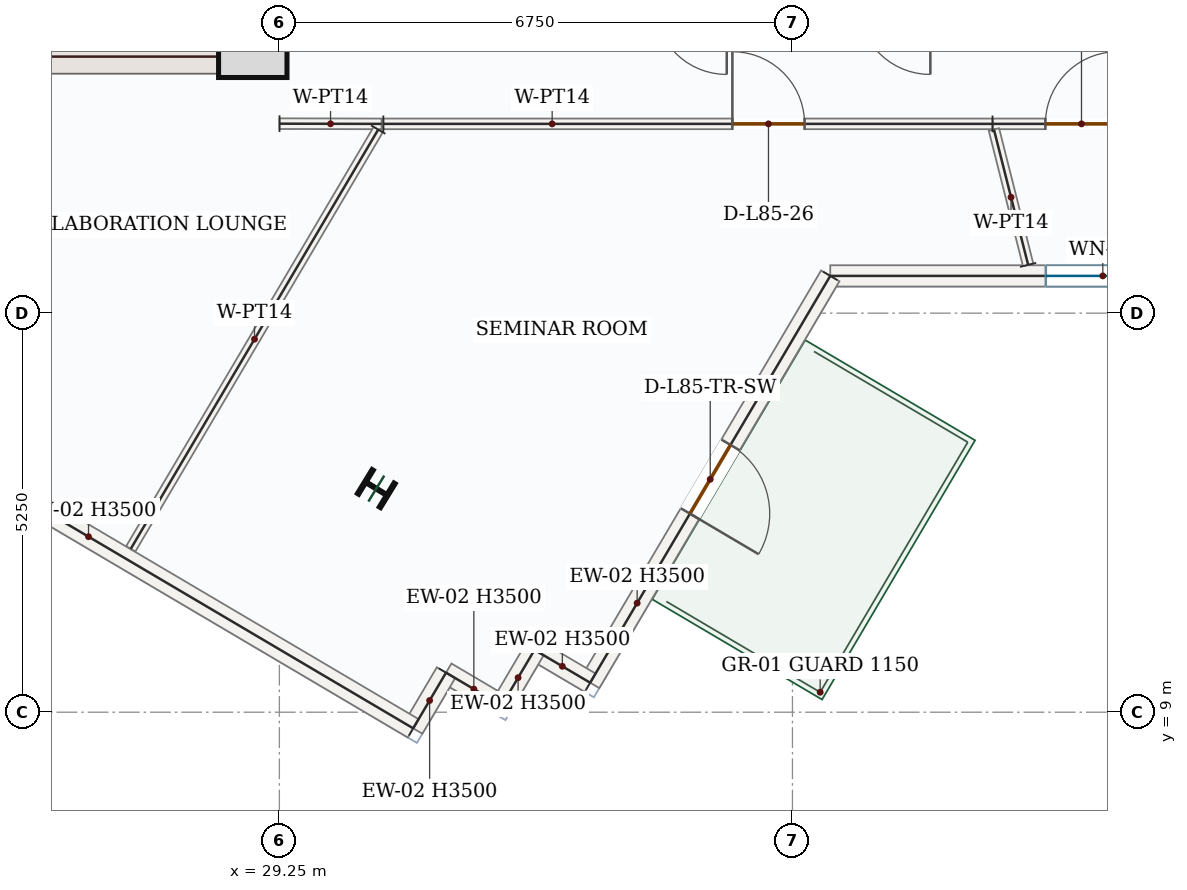
"""IFC4 building model, lengths in metres.
Left out: names, types, materials, properties, quantities, classifications, styles, units other than length and angle.
Written with IfcOpenShell. Run it as: python <this file> out.ifc"""

import sys

from ifc_helpers import new_model, si_unit, direction, frame, frame_2d, origin, origin_2d, place, context, subcontext, project, spatial, rectangle, i_section, extrude, source, transform, mapped, element, fill, save


model = new_model("IFC4")
c1 = context("Model", 3, precision=1e-05, world=origin(), true_north=direction((0.0, 1.0)))
c2 = subcontext(c1, "Body", "Model", "MODEL_VIEW")
j1 = project(units=[si_unit("LENGTHUNIT", "METRE"), si_unit("PLANEANGLEUNIT", "RADIAN")], contexts=[c1])
p1 = place(None, origin())
s1 = spatial("IfcSite", under=j1, at=p1, CompositionType="ELEMENT")
p2 = place(p1, origin())
s2 = spatial("IfcBuilding", under=s1, at=p2, CompositionType="ELEMENT")
p3 = place(p2, frame((0.0, 0.0, 349.8)))
s3 = spatial("IfcBuildingStorey", under=s2, at=p3, CompositionType="ELEMENT", Elevation=349.8)
p4 = place(p3, frame((29.025, 17.4, 0.0), z_axis=(0.0, 0.0, 1.0), x_axis=(0.0, 1.0, 0.0)))
e1 = element("IfcWall", 1, at=p4, inside=s3, PredefinedType="SHEAR", context=c2, shape_type="SweptSolid", body=[
    extrude(rectangle(XDim=8.55, YDim=0.45, at=frame_2d((4.275, 0.0))), origin(), (0.0, 0.0, 1.0), 3.5),
])
p5 = place(p4, frame((6.65, 0.0, 0.0)))
e2 = element("IfcOpeningElement", 2, at=p5, cuts=e1, PredefinedType="OPENING", context=c2, shape_type="SweptSolid", body=[
    extrude(rectangle(XDim=1.1, YDim=2.2, at=frame_2d((0.55, 1.1))), frame((0.0, 0.235, 0.0), z_axis=(0.0, -1.0, 0.0), x_axis=(1.0, 0.0, 0.0)), (0.0, 0.0, 1.0), 0.47),
])
p6 = place(p4, frame((2.7, 0.0, 0.0)))
e3 = element("IfcOpeningElement", 3, at=p6, cuts=e1, PredefinedType="OPENING", context=c2, shape_type="SweptSolid", body=[
    extrude(rectangle(XDim=0.88, YDim=2.1, at=frame_2d((0.44, 1.05))), frame((0.0, 0.235, 0.0), z_axis=(0.0, -1.0, 0.0), x_axis=(1.0, 0.0, 0.0)), (0.0, 0.0, 1.0), 0.47),
])
p7 = place(p4, frame((4.6, 0.0, 0.0)))
e4 = element("IfcOpeningElement", 4, at=p7, cuts=e1, PredefinedType="OPENING", context=c2, shape_type="SweptSolid", body=[
    extrude(rectangle(XDim=0.88, YDim=2.1, at=frame_2d((0.44, 1.05))), frame((0.0, 0.235, 0.0), z_axis=(0.0, -1.0, 0.0), x_axis=(1.0, 0.0, 0.0)), (0.0, 0.0, 1.0), 0.47),
])
m1 = source(origin(), c2, "Body", "SweptSolid", [
    extrude(rectangle(XDim=7.1, YDim=0.45, at=frame_2d((3.55, 0.0))), origin(), (0.0, 0.0, 1.0), 3.5),
])
p8 = place(p3, frame((21.7, 17.625, 0.0), z_axis=(0.0, 0.0, 1.0), x_axis=(1.0, 0.0, 0.0)))
e5 = element("IfcWall", 5, at=p8, inside=s3, PredefinedType="SHEAR", context=c2, shape_type="MappedRepresentation", body=[
    mapped(m1, transform((0.0, 0.0, 0.0), x_axis=(1.0, 0.0, 0.0), y_axis=(0.0, 1.0, 0.0), z_axis=(0.0, 0.0, 1.0), scale=1.0)),
])
m2 = source(origin(), c2, "Body", "SweptSolid", [
    extrude(rectangle(XDim=0.9, YDim=0.9, at=origin_2d()), origin(), (0.0, 0.0, 1.0), 3.75),
])
p9 = place(p3, frame((28.9, 17.8, 0.0), z_axis=(0.0, 0.0, 1.0), x_axis=(1.0, 0.0, 0.0)))
e6 = element("IfcColumn", 6, at=p9, inside=s3, PredefinedType="COLUMN", context=c2, shape_type="MappedRepresentation", body=[
    mapped(m2, transform((0.0, 0.0, 0.0), x_axis=(1.0, 0.0, 0.0), y_axis=(0.0, 1.0, 0.0), z_axis=(0.0, 0.0, 1.0), scale=1.0)),
])
m3 = source(origin(), c2, "Body", "SweptSolid", [
    extrude(i_section(OverallWidth=0.369, OverallDepth=0.356, WebThickness=0.011, FlangeThickness=0.018, FilletRadius=0.018, at=origin_2d()), origin(), (0.0, 0.0, 1.0), 3.75),
])
p10 = place(p3, frame((30.525, 11.942, 0.0), z_axis=(0.0, 0.0, 1.0), x_axis=(0.522498564716, 0.852640164354, 0.0)))
e7 = element("IfcColumn", 7, at=p10, inside=s3, PredefinedType="COLUMN", context=c2, shape_type="MappedRepresentation", body=[
    mapped(m3, transform((0.0, 0.0, 0.0), x_axis=(1.0, 0.0, 0.0), y_axis=(0.0, 1.0, 0.0), z_axis=(0.0, 0.0, 1.0), scale=1.0)),
])
p11 = place(p3, frame((43.669, 14.74, 0.0), z_axis=(0.0, 0.0, 1.0), x_axis=(-1.0, 0.0, 0.0)))
e8 = element("IfcWall", 8, at=p11, inside=s3, PredefinedType="SOLIDWALL", context=c2, shape_type="SweptSolid", body=[
    extrude(rectangle(XDim=7.172, YDim=0.28, at=frame_2d((3.586, 0.0))), origin(), (0.0, 0.0, 1.0), 3.5),
])
p12 = place(p11, frame((2.836, 0.0, 0.85)))
e9 = element("IfcOpeningElement", 9, at=p12, cuts=e8, PredefinedType="OPENING", context=c2, shape_type="SweptSolid", body=[
    extrude(rectangle(XDim=1.5, YDim=1.5, at=frame_2d((0.75, 0.75))), frame((0.0, 0.15, 0.0), z_axis=(0.0, -1.0, 0.0), x_axis=(1.0, 0.0, 0.0)), (0.0, 0.0, 1.0), 0.3),
])
p13 = place(p3, frame((36.497, 14.74, 0.0), z_axis=(0.0, 0.0, 1.0), x_axis=(-0.508266003384, -0.861200133421, 0.0)))
e10 = element("IfcWall", 10, at=p13, inside=s3, PredefinedType="SOLIDWALL", context=c2, shape_type="SweptSolid", body=[
    extrude(rectangle(XDim=6.215, YDim=0.28, at=frame_2d((3.107, 0.0))), origin(), (0.0, 0.0, 1.0), 3.5),
])
p14 = place(p13, frame((2.582, 0.0, 0.0)))
e11 = element("IfcOpeningElement", 11, at=p14, cuts=e10, PredefinedType="OPENING", context=c2, shape_type="SweptSolid", body=[
    extrude(rectangle(XDim=1.05, YDim=2.15, at=frame_2d((0.525, 1.075))), frame((0.0, 0.15, 0.0), z_axis=(0.0, -1.0, 0.0), x_axis=(1.0, 0.0, 0.0)), (0.0, 0.0, 1.0), 0.3),
])
m4 = source(origin(), c2, "Body", "SweptSolid", [
    extrude(rectangle(XDim=0.85, YDim=0.28, at=frame_2d((0.425, 0.0))), origin(), (0.0, 0.0, 1.0), 3.5),
])
for number, where, z_axis, x_axis in (
    (12, (33.339, 9.388, 0.0), (0.0, 0.0, 1.0), (-0.861, 0.508, 0.0)),
    (13, (32.606, 9.82, 0.0), (0.0, 0.0, 1.0), (-0.508, -0.861, 0.0)),
    (14, (32.175, 9.088, 0.0), (0.0, 0.0, 1.0), (-0.861, 0.508, 0.0)),
):
    element("IfcWall", number, at=place(p3, frame(where, z_axis=z_axis, x_axis=x_axis)), inside=s3, PredefinedType="SOLIDWALL", context=c2, shape_type="MappedRepresentation", body=[
        mapped(m4, transform((0.0, 0.0, 0.0), x_axis=(1.0, 0.0, 0.0), y_axis=(0.0, 1.0, 0.0), z_axis=(0.0, 0.0, 1.0), scale=1.0)),
    ])
m5 = source(origin(), c2, "Body", "SweptSolid", [
    extrude(rectangle(XDim=0.85, YDim=0.28, at=frame_2d((0.425, 0.0))), origin(), (0.0, 0.0, 1.0), 3.5),
])
p15 = place(p3, frame((31.442, 9.52, 0.0), z_axis=(0.0, 0.0, 1.0), x_axis=(-0.508187218622, -0.861246626019, 0.0)))
e15 = element("IfcWall", 15, at=p15, inside=s3, PredefinedType="SOLIDWALL", context=c2, shape_type="MappedRepresentation", body=[
    mapped(m5, transform((0.0, 0.0, 0.0), x_axis=(1.0, 0.0, 0.0), y_axis=(0.0, 1.0, 0.0), z_axis=(0.0, 0.0, 1.0), scale=1.0)),
])
m6 = source(origin(), c2, "Body", "SweptSolid", [
    extrude(rectangle(XDim=9.92, YDim=0.28, at=frame_2d((4.96, 0.0))), origin(), (0.0, 0.0, 1.0), 3.5),
])
p16 = place(p3, frame((31.01, 8.788, 0.0), z_axis=(0.0, 0.0, 1.0), x_axis=(-0.861192451778, 0.508279018848, 0.0)))
e16 = element("IfcWall", 16, at=p16, inside=s3, PredefinedType="SOLIDWALL", context=c2, shape_type="MappedRepresentation", body=[
    mapped(m6, transform((0.0, 0.0, 0.0), x_axis=(1.0, 0.0, 0.0), y_axis=(0.0, 1.0, 0.0), z_axis=(0.0, 0.0, 1.0), scale=1.0)),
])
p17 = place(p3, frame((38.632, 16.74, 0.0), z_axis=(0.0, 0.0, 1.0), x_axis=(1.0, 0.0, 0.0)))
e17 = element("IfcWall", 17, at=p17, inside=s3, PredefinedType="PARTITIONING", context=c2, shape_type="SweptSolid", body=[
    extrude(rectangle(XDim=4.112, YDim=0.14, at=frame_2d((2.056, 0.0))), origin(), (0.0, 0.0, 1.0), 3.5),
])
p18 = place(p17, frame((0.696, 0.0, 0.0)))
e18 = element("IfcOpeningElement", 18, at=p18, cuts=e17, PredefinedType="OPENING", context=c2, shape_type="SweptSolid", body=[
    extrude(rectangle(XDim=0.95, YDim=2.15, at=frame_2d((0.475, 1.075))), frame((0.0, 0.08, 0.0), z_axis=(0.0, -1.0, 0.0), x_axis=(1.0, 0.0, 0.0)), (0.0, 0.0, 1.0), 0.16),
])
m7 = source(origin(), c2, "Body", "SweptSolid", [
    extrude(rectangle(XDim=1.836, YDim=0.14, at=frame_2d((0.918, 0.0))), origin(), (0.0, 0.0, 1.0), 3.5),
])
p19 = place(p3, frame((39.101, 14.885, 0.0), z_axis=(0.0, 0.0, 1.0), x_axis=(-0.24494411221, 0.96953719985, 0.0)))
e19 = element("IfcWall", 19, at=p19, inside=s3, PredefinedType="PARTITIONING", context=c2, shape_type="MappedRepresentation", body=[
    mapped(m7, transform((0.0, 0.0, 0.0), x_axis=(1.0, 0.0, 0.0), y_axis=(0.0, 1.0, 0.0), z_axis=(0.0, 0.0, 1.0), scale=1.0)),
])
m8 = source(origin(), c2, "Body", "SweptSolid", [
    extrude(rectangle(XDim=1.343, YDim=0.14, at=frame_2d((0.671, 0.0))), origin(), (0.0, 0.0, 1.0), 3.5),
])
p20 = place(p3, frame((29.252, 16.743, 0.0), z_axis=(0.0, 0.0, 1.0), x_axis=(0.999997619843, -0.002181812989, 0.0)))
e20 = element("IfcWall", 20, at=p20, inside=s3, PredefinedType="PARTITIONING", context=c2, shape_type="MappedRepresentation", body=[
    mapped(m8, transform((0.0, 0.0, 0.0), x_axis=(1.0, 0.0, 0.0), y_axis=(0.0, 1.0, 0.0), z_axis=(0.0, 0.0, 1.0), scale=1.0)),
])
m9 = source(origin(), c2, "Body", "SweptSolid", [
    extrude(rectangle(XDim=6.405, YDim=0.14, at=frame_2d((3.202, 0.0))), origin(), (0.0, 0.0, 1.0), 3.5),
])
p21 = place(p3, frame((30.55, 16.665, 0.0), z_axis=(0.0, 0.0, 1.0), x_axis=(-0.508299006291, -0.861180654801, 0.0)))
e21 = element("IfcWall", 21, at=p21, inside=s3, PredefinedType="PARTITIONING", context=c2, shape_type="MappedRepresentation", body=[
    mapped(m9, transform((0.0, 0.0, 0.0), x_axis=(1.0, 0.0, 0.0), y_axis=(0.0, 1.0, 0.0), z_axis=(0.0, 0.0, 1.0), scale=1.0)),
])
p22 = place(p3, frame((30.618, 16.74, 0.0), z_axis=(0.0, 0.0, 1.0), x_axis=(1.0, 0.0, 0.0)))
e22 = element("IfcWall", 22, at=p22, inside=s3, PredefinedType="PARTITIONING", context=c2, shape_type="SweptSolid", body=[
    extrude(rectangle(XDim=8.014, YDim=0.14, at=frame_2d((4.007, 0.0))), origin(), (0.0, 0.0, 1.0), 3.5),
])
p23 = place(p22, frame((4.592, 0.0, 0.0)))
e23 = element("IfcOpeningElement", 23, at=p23, cuts=e22, PredefinedType="OPENING", context=c2, shape_type="SweptSolid", body=[
    extrude(rectangle(XDim=0.95, YDim=2.15, at=frame_2d((0.475, 1.075))), frame((0.0, 0.08, 0.0), z_axis=(0.0, -1.0, 0.0), x_axis=(1.0, 0.0, 0.0)), (0.0, 0.0, 1.0), 0.16),
])
m10 = source(origin(), c2, "Body", "SweptSolid", [
    extrude(rectangle(XDim=1.5, YDim=1.5, at=frame_2d((0.75, 0.75))), frame((0.0, 0.03, 0.0), z_axis=(0.0, -1.0, 0.0), x_axis=(1.0, 0.0, 0.0)), (0.0, 0.0, 1.0), 0.06),
])
p24 = place(p12, origin())
e24 = element("IfcWindow", 24, at=p24, inside=s3, PartitioningType="SINGLE_PANEL", PredefinedType="WINDOW", context=c2, shape_type="MappedRepresentation", body=[
    mapped(m10, transform((0.0, 0.0, 0.0), x_axis=(1.0, 0.0, 0.0), y_axis=(0.0, 1.0, 0.0), z_axis=(0.0, 0.0, 1.0), scale=1.0)),
])
fill(e9, e24)
m11 = source(origin(), c2, "Body", "SweptSolid", [
    extrude(rectangle(XDim=1.05, YDim=2.15, at=frame_2d((0.525, 1.075))), frame((0.0, 0.025, 0.0), z_axis=(0.0, -1.0, 0.0), x_axis=(1.0, 0.0, 0.0)), (0.0, 0.0, 1.0), 0.05),
])
p25 = place(p14, origin())
e25 = element("IfcDoor", 25, at=p25, inside=s3, OperationType="SINGLE_SWING_RIGHT", PredefinedType="DOOR", context=c2, shape_type="MappedRepresentation", body=[
    mapped(m11, transform((0.0, 0.0, 0.0), x_axis=(1.0, 0.0, 0.0), y_axis=(0.0, 1.0, 0.0), z_axis=(0.0, 0.0, 1.0), scale=1.0)),
])
fill(e11, e25)
m12 = source(origin(), c2, "Body", "SweptSolid", [
    extrude(rectangle(XDim=0.95, YDim=2.15, at=frame_2d((0.475, 1.075))), frame((0.0, 0.025, 0.0), z_axis=(0.0, -1.0, 0.0), x_axis=(1.0, 0.0, 0.0)), (0.0, 0.0, 1.0), 0.05),
])
p26 = place(p23, origin())
e26 = element("IfcDoor", 26, at=p26, inside=s3, OperationType="SINGLE_SWING_LEFT", PredefinedType="DOOR", context=c2, shape_type="MappedRepresentation", body=[
    mapped(m12, transform((0.0, 0.0, 0.0), x_axis=(1.0, 0.0, 0.0), y_axis=(0.0, 1.0, 0.0), z_axis=(0.0, 0.0, 1.0), scale=1.0)),
])
fill(e23, e26)
p27 = place(p18, origin())
e27 = element("IfcDoor", 27, at=p27, inside=s3, OperationType="SINGLE_SWING_RIGHT", PredefinedType="DOOR", context=c2, shape_type="MappedRepresentation", body=[
    mapped(m12, transform((0.0, 0.0, 0.0), x_axis=(1.0, 0.0, 0.0), y_axis=(0.0, 1.0, 0.0), z_axis=(0.0, 0.0, 1.0), scale=1.0)),
])
fill(e18, e27)
save(model, sys.argv[1])
